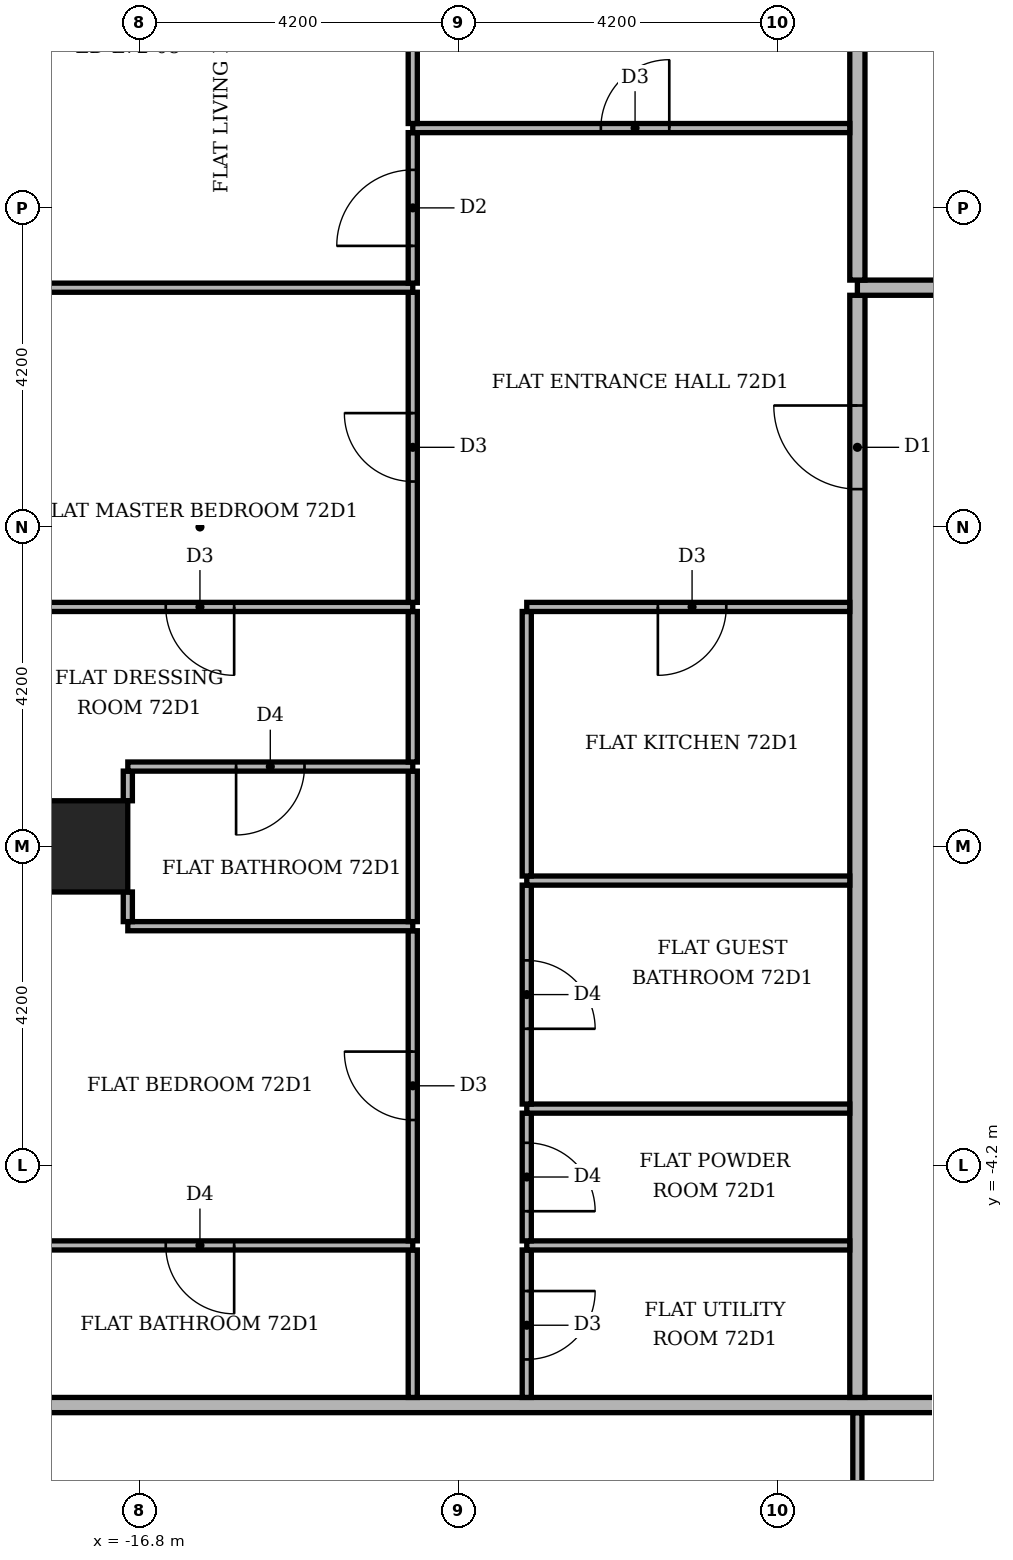
"""IFC4 building model, lengths in metres.
Left out: names, types, materials, properties, quantities, classifications, styles, units other than length and angle.
Written with IfcOpenShell. Run it as: python <this file> out.ifc"""

import sys

from ifc_helpers import new_model, si_unit, direction, frame, frame_2d, origin, origin_2d, place, context, subcontext, project, spatial, rectangle, extrude, element, fill, save


model = new_model("IFC4")
c1 = context("Model", 3, precision=1e-05, world=origin(), true_north=direction((0.0, 1.0)))
c2 = subcontext(c1, "Body", "Model", "MODEL_VIEW")
j1 = project(units=[si_unit("LENGTHUNIT", "METRE"), si_unit("PLANEANGLEUNIT", "RADIAN")], contexts=[c1])
p1 = place(None, origin())
s1 = spatial("IfcSite", under=j1, at=p1, CompositionType="ELEMENT")
p2 = place(p1, origin())
s2 = spatial("IfcBuilding", under=s1, at=p2, CompositionType="ELEMENT")
p3 = place(p2, frame((0.0, 0.0, 300.6)))
s3 = spatial("IfcBuildingStorey", under=s2, at=p3, CompositionType="ELEMENT", Elevation=300.6)
p4 = place(p3, frame((-17.55, 0.0, -0.35), z_axis=(0.0, 0.0, 1.0), x_axis=(1.0, 0.0, 0.0)))
e1 = element("IfcColumn", 1, at=p4, inside=s3, PredefinedType="COLUMN", context=c2, shape_type="SweptSolid", body=[
    extrude(rectangle(XDim=1.2, YDim=1.2, at=origin_2d()), origin(), (0.0, 0.0, 1.0), 4.25),
])
p5 = place(p3, frame((-7.35, -12.84, 0.0), z_axis=(0.0, 0.0, 1.0), x_axis=(0.0, 1.0, 0.0)))
e2 = element("IfcWall", 2, at=p5, inside=s3, PredefinedType="PARTITIONING", context=c2, shape_type="SweptSolid", body=[
    extrude(rectangle(XDim=5.39, YDim=0.12, at=frame_2d((2.695, 0.0))), origin(), (0.0, 0.0, 1.0), 3.55),
])
p6 = place(p5, frame((2.265, 0.0, 0.0)))
e3 = element("IfcOpeningElement", 3, at=p6, cuts=e2, PredefinedType="OPENING", context=c2, shape_type="SweptSolid", body=[
    extrude(rectangle(XDim=0.9, YDim=2.1, at=frame_2d((0.45, 1.05))), frame((0.0, 0.07, 0.0), z_axis=(0.0, -1.0, 0.0), x_axis=(1.0, 0.0, 0.0)), (0.0, 0.0, 1.0), 0.14),
])
p7 = place(p3, frame((-18.5, -7.35, 0.0), z_axis=(0.0, 0.0, 1.0), x_axis=(1.0, 0.0, 0.0)))
e4 = element("IfcWall", 4, at=p7, inside=s3, PredefinedType="PARTITIONING", context=c2, shape_type="SweptSolid", body=[
    extrude(rectangle(XDim=25.85, YDim=0.2, at=frame_2d((12.925, 0.0))), origin(), (0.0, 0.0, 1.0), 3.55),
])
p8 = place(p7, frame((13.75, 0.0, 0.0)))
e5 = element("IfcOpeningElement", 5, at=p8, cuts=e4, PredefinedType="OPENING", context=c2, shape_type="SweptSolid", body=[
    extrude(rectangle(XDim=1.1, YDim=2.4, at=frame_2d((0.55, 1.2))), frame((0.0, 0.11, 0.0), z_axis=(0.0, -1.0, 0.0), x_axis=(1.0, 0.0, 0.0)), (0.0, 0.0, 1.0), 0.22),
])
p9 = place(p3, frame((-13.2, -7.25, 0.0), z_axis=(0.0, 0.0, 1.0), x_axis=(0.0, 1.0, 0.0)))
e6 = element("IfcWall", 6, at=p9, inside=s3, PredefinedType="PARTITIONING", context=c2, shape_type="SweptSolid", body=[
    extrude(rectangle(XDim=1.94, YDim=0.12, at=frame_2d((0.97, 0.0))), origin(), (0.0, 0.0, 1.0), 3.55),
])
p10 = place(p3, frame((-11.7, -7.25, 0.0), z_axis=(0.0, 0.0, 1.0), x_axis=(0.0, 1.0, 0.0)))
e7 = element("IfcWall", 7, at=p10, inside=s3, PredefinedType="PARTITIONING", context=c2, shape_type="SweptSolid", body=[
    extrude(rectangle(XDim=1.94, YDim=0.12, at=frame_2d((0.97, 0.0))), origin(), (0.0, 0.0, 1.0), 3.55),
])
p11 = place(p10, frame((0.5, 0.0, 0.0)))
e8 = element("IfcOpeningElement", 8, at=p11, cuts=e7, PredefinedType="OPENING", context=c2, shape_type="SweptSolid", body=[
    extrude(rectangle(XDim=0.9, YDim=2.1, at=frame_2d((0.45, 1.05))), frame((0.0, 0.07, 0.0), z_axis=(0.0, -1.0, 0.0), x_axis=(1.0, 0.0, 0.0)), (0.0, 0.0, 1.0), 0.14),
])
p12 = place(p3, frame((-7.35, -7.25, 0.0), z_axis=(0.0, 0.0, 1.0), x_axis=(0.0, 1.0, 0.0)))
e9 = element("IfcWall", 9, at=p12, inside=s3, PredefinedType="PARTITIONING", context=c2, shape_type="SweptSolid", body=[
    extrude(rectangle(XDim=14.5, YDim=0.2, at=frame_2d((7.25, 0.0))), origin(), (0.0, 0.0, 1.0), 3.55),
])
p13 = place(p12, frame((11.95, 0.0, 0.0)))
e10 = element("IfcOpeningElement", 10, at=p13, cuts=e9, PredefinedType="OPENING", context=c2, shape_type="SweptSolid", body=[
    extrude(rectangle(XDim=1.1, YDim=2.4, at=frame_2d((0.55, 1.2))), frame((0.0, 0.11, 0.0), z_axis=(0.0, -1.0, 0.0), x_axis=(1.0, 0.0, 0.0)), (0.0, 0.0, 1.0), 0.22),
])
p14 = place(p3, frame((-18.5, -5.25, 0.0), z_axis=(0.0, 0.0, 1.0), x_axis=(1.0, 0.0, 0.0)))
e11 = element("IfcWall", 11, at=p14, inside=s3, PredefinedType="PARTITIONING", context=c2, shape_type="SweptSolid", body=[
    extrude(rectangle(XDim=5.3, YDim=0.12, at=frame_2d((2.65, 0.0))), origin(), (0.0, 0.0, 1.0), 3.55),
])
p15 = place(p14, frame((2.05, 0.0, 0.0)))
e12 = element("IfcOpeningElement", 12, at=p15, cuts=e11, PredefinedType="OPENING", context=c2, shape_type="SweptSolid", body=[
    extrude(rectangle(XDim=0.9, YDim=2.1, at=frame_2d((0.45, 1.05))), frame((0.0, 0.07, 0.0), z_axis=(0.0, -1.0, 0.0), x_axis=(1.0, 0.0, 0.0)), (0.0, 0.0, 1.0), 0.14),
])
p16 = place(p3, frame((-11.7, -5.25, 0.0), z_axis=(0.0, 0.0, 1.0), x_axis=(1.0, 0.0, 0.0)))
e13 = element("IfcWall", 13, at=p16, inside=s3, PredefinedType="PARTITIONING", context=c2, shape_type="SweptSolid", body=[
    extrude(rectangle(XDim=4.25, YDim=0.12, at=frame_2d((2.125, 0.0))), origin(), (0.0, 0.0, 1.0), 3.55),
])
p17 = place(p3, frame((-13.2, -5.19, 0.0), z_axis=(0.0, 0.0, 1.0), x_axis=(0.0, 1.0, 0.0)))
e14 = element("IfcWall", 14, at=p17, inside=s3, PredefinedType="PARTITIONING", context=c2, shape_type="SweptSolid", body=[
    extrude(rectangle(XDim=4.08, YDim=0.12, at=frame_2d((2.04, 0.0))), origin(), (0.0, 0.0, 1.0), 3.55),
])
p18 = place(p17, frame((1.59, 0.0, 0.0)))
e15 = element("IfcOpeningElement", 15, at=p18, cuts=e14, PredefinedType="OPENING", context=c2, shape_type="SweptSolid", body=[
    extrude(rectangle(XDim=0.9, YDim=2.1, at=frame_2d((0.45, 1.05))), frame((0.0, 0.07, 0.0), z_axis=(0.0, -1.0, 0.0), x_axis=(1.0, 0.0, 0.0)), (0.0, 0.0, 1.0), 0.14),
])
p19 = place(p3, frame((-11.7, -5.19, 0.0), z_axis=(0.0, 0.0, 1.0), x_axis=(0.0, 1.0, 0.0)))
e16 = element("IfcWall", 16, at=p19, inside=s3, PredefinedType="PARTITIONING", context=c2, shape_type="SweptSolid", body=[
    extrude(rectangle(XDim=1.68, YDim=0.12, at=frame_2d((0.84, 0.0))), origin(), (0.0, 0.0, 1.0), 3.55),
])
p20 = place(p19, frame((0.39, 0.0, 0.0)))
e17 = element("IfcOpeningElement", 17, at=p20, cuts=e16, PredefinedType="OPENING", context=c2, shape_type="SweptSolid", body=[
    extrude(rectangle(XDim=0.9, YDim=2.1, at=frame_2d((0.45, 1.05))), frame((0.0, 0.07, 0.0), z_axis=(0.0, -1.0, 0.0), x_axis=(1.0, 0.0, 0.0)), (0.0, 0.0, 1.0), 0.14),
])
p21 = place(p3, frame((-11.7, -3.45, 0.0), z_axis=(0.0, 0.0, 1.0), x_axis=(1.0, 0.0, 0.0)))
e18 = element("IfcWall", 18, at=p21, inside=s3, PredefinedType="PARTITIONING", context=c2, shape_type="SweptSolid", body=[
    extrude(rectangle(XDim=4.25, YDim=0.12, at=frame_2d((2.125, 0.0))), origin(), (0.0, 0.0, 1.0), 3.55),
])
p22 = place(p3, frame((-11.7, -3.39, 0.0), z_axis=(0.0, 0.0, 1.0), x_axis=(0.0, 1.0, 0.0)))
e19 = element("IfcWall", 19, at=p22, inside=s3, PredefinedType="PARTITIONING", context=c2, shape_type="SweptSolid", body=[
    extrude(rectangle(XDim=2.88, YDim=0.12, at=frame_2d((1.44, 0.0))), origin(), (0.0, 0.0, 1.0), 3.55),
])
p23 = place(p22, frame((0.99, 0.0, 0.0)))
e20 = element("IfcOpeningElement", 20, at=p23, cuts=e19, PredefinedType="OPENING", context=c2, shape_type="SweptSolid", body=[
    extrude(rectangle(XDim=0.9, YDim=2.1, at=frame_2d((0.45, 1.05))), frame((0.0, 0.07, 0.0), z_axis=(0.0, -1.0, 0.0), x_axis=(1.0, 0.0, 0.0)), (0.0, 0.0, 1.0), 0.14),
])
p24 = place(p3, frame((-16.949, -1.05, 0.0), z_axis=(0.0, 0.0, 1.0), x_axis=(1.0, 0.0, 0.0)))
e21 = element("IfcWall", 21, at=p24, inside=s3, PredefinedType="PARTITIONING", context=c2, shape_type="SweptSolid", body=[
    extrude(rectangle(XDim=3.749, YDim=0.12, at=frame_2d((1.875, 0.0))), origin(), (0.0, 0.0, 1.0), 3.55),
])
p25 = place(p3, frame((-16.949, -0.99, 0.0), z_axis=(0.0, 0.0, 1.0), x_axis=(0.0, 1.0, 0.0)))
e22 = element("IfcWall", 22, at=p25, inside=s3, PredefinedType="PARTITIONING", context=c2, shape_type="SweptSolid", body=[
    extrude(rectangle(XDim=0.39, YDim=0.12, at=frame_2d((0.195, 0.0))), origin(), (0.0, 0.0, 1.0), 3.55),
])
p26 = place(p3, frame((-13.2, -0.99, 0.0), z_axis=(0.0, 0.0, 1.0), x_axis=(0.0, 1.0, 0.0)))
e23 = element("IfcWall", 23, at=p26, inside=s3, PredefinedType="PARTITIONING", context=c2, shape_type="SweptSolid", body=[
    extrude(rectangle(XDim=1.98, YDim=0.12, at=frame_2d((0.99, 0.0))), origin(), (0.0, 0.0, 1.0), 3.55),
])
p27 = place(p3, frame((-11.7, -0.45, 0.0), z_axis=(0.0, 0.0, 1.0), x_axis=(1.0, 0.0, 0.0)))
e24 = element("IfcWall", 24, at=p27, inside=s3, PredefinedType="PARTITIONING", context=c2, shape_type="SweptSolid", body=[
    extrude(rectangle(XDim=4.25, YDim=0.12, at=frame_2d((2.125, 0.0))), origin(), (0.0, 0.0, 1.0), 3.55),
])
p28 = place(p3, frame((-11.7, -0.39, 0.0), z_axis=(0.0, 0.0, 1.0), x_axis=(0.0, 1.0, 0.0)))
e25 = element("IfcWall", 25, at=p28, inside=s3, PredefinedType="PARTITIONING", context=c2, shape_type="SweptSolid", body=[
    extrude(rectangle(XDim=3.48, YDim=0.12, at=frame_2d((1.74, 0.0))), origin(), (0.0, 0.0, 1.0), 3.55),
])
p29 = place(p3, frame((-16.949, 0.6, 0.0), z_axis=(0.0, 0.0, 1.0), x_axis=(0.0, 1.0, 0.0)))
e26 = element("IfcWall", 26, at=p29, inside=s3, PredefinedType="PARTITIONING", context=c2, shape_type="SweptSolid", body=[
    extrude(rectangle(XDim=0.39, YDim=0.12, at=frame_2d((0.195, 0.0))), origin(), (0.0, 0.0, 1.0), 3.55),
])
p30 = place(p3, frame((-16.949, 1.05, 0.0), z_axis=(0.0, 0.0, 1.0), x_axis=(1.0, 0.0, 0.0)))
e27 = element("IfcWall", 27, at=p30, inside=s3, PredefinedType="PARTITIONING", context=c2, shape_type="SweptSolid", body=[
    extrude(rectangle(XDim=3.749, YDim=0.12, at=frame_2d((1.875, 0.0))), origin(), (0.0, 0.0, 1.0), 3.55),
])
p31 = place(p30, frame((1.425, 0.0, 0.0)))
e28 = element("IfcOpeningElement", 28, at=p31, cuts=e27, PredefinedType="OPENING", context=c2, shape_type="SweptSolid", body=[
    extrude(rectangle(XDim=0.9, YDim=2.1, at=frame_2d((0.45, 1.05))), frame((0.0, 0.07, 0.0), z_axis=(0.0, -1.0, 0.0), x_axis=(1.0, 0.0, 0.0)), (0.0, 0.0, 1.0), 0.14),
])
p32 = place(p3, frame((-13.2, 1.11, 0.0), z_axis=(0.0, 0.0, 1.0), x_axis=(0.0, 1.0, 0.0)))
e29 = element("IfcWall", 29, at=p32, inside=s3, PredefinedType="PARTITIONING", context=c2, shape_type="SweptSolid", body=[
    extrude(rectangle(XDim=1.98, YDim=0.12, at=frame_2d((0.99, 0.0))), origin(), (0.0, 0.0, 1.0), 3.55),
])
p33 = place(p3, frame((-18.5, 3.15, 0.0), z_axis=(0.0, 0.0, 1.0), x_axis=(1.0, 0.0, 0.0)))
e30 = element("IfcWall", 30, at=p33, inside=s3, PredefinedType="PARTITIONING", context=c2, shape_type="SweptSolid", body=[
    extrude(rectangle(XDim=5.3, YDim=0.12, at=frame_2d((2.65, 0.0))), origin(), (0.0, 0.0, 1.0), 3.55),
])
p34 = place(p33, frame((2.05, 0.0, 0.0)))
e31 = element("IfcOpeningElement", 31, at=p34, cuts=e30, PredefinedType="OPENING", context=c2, shape_type="SweptSolid", body=[
    extrude(rectangle(XDim=0.9, YDim=2.1, at=frame_2d((0.45, 1.05))), frame((0.0, 0.07, 0.0), z_axis=(0.0, -1.0, 0.0), x_axis=(1.0, 0.0, 0.0)), (0.0, 0.0, 1.0), 0.14),
])
p35 = place(p3, frame((-11.7, 3.15, 0.0), z_axis=(0.0, 0.0, 1.0), x_axis=(1.0, 0.0, 0.0)))
e32 = element("IfcWall", 32, at=p35, inside=s3, PredefinedType="PARTITIONING", context=c2, shape_type="SweptSolid", body=[
    extrude(rectangle(XDim=4.25, YDim=0.12, at=frame_2d((2.125, 0.0))), origin(), (0.0, 0.0, 1.0), 3.55),
])
p36 = place(p35, frame((1.725, 0.0, 0.0)))
e33 = element("IfcOpeningElement", 33, at=p36, cuts=e32, PredefinedType="OPENING", context=c2, shape_type="SweptSolid", body=[
    extrude(rectangle(XDim=0.9, YDim=2.1, at=frame_2d((0.45, 1.05))), frame((0.0, 0.07, 0.0), z_axis=(0.0, -1.0, 0.0), x_axis=(1.0, 0.0, 0.0)), (0.0, 0.0, 1.0), 0.14),
])
p37 = place(p3, frame((-13.2, 3.21, 0.0), z_axis=(0.0, 0.0, 1.0), x_axis=(0.0, 1.0, 0.0)))
e34 = element("IfcWall", 34, at=p37, inside=s3, PredefinedType="PARTITIONING", context=c2, shape_type="SweptSolid", body=[
    extrude(rectangle(XDim=4.08, YDim=0.12, at=frame_2d((2.04, 0.0))), origin(), (0.0, 0.0, 1.0), 3.55),
])
p38 = place(p37, frame((1.59, 0.0, 0.0)))
e35 = element("IfcOpeningElement", 35, at=p38, cuts=e34, PredefinedType="OPENING", context=c2, shape_type="SweptSolid", body=[
    extrude(rectangle(XDim=0.9, YDim=2.1, at=frame_2d((0.45, 1.05))), frame((0.0, 0.07, 0.0), z_axis=(0.0, -1.0, 0.0), x_axis=(1.0, 0.0, 0.0)), (0.0, 0.0, 1.0), 0.14),
])
p39 = place(p3, frame((-18.5, 7.35, 0.0), z_axis=(0.0, 0.0, 1.0), x_axis=(1.0, 0.0, 0.0)))
e36 = element("IfcWall", 36, at=p39, inside=s3, PredefinedType="PARTITIONING", context=c2, shape_type="SweptSolid", body=[
    extrude(rectangle(XDim=5.3, YDim=0.12, at=frame_2d((2.65, 0.0))), origin(), (0.0, 0.0, 1.0), 3.55),
])
p40 = place(p3, frame((-7.35, 7.35, 0.0), z_axis=(0.0, 0.0, 1.0), x_axis=(1.0, 0.0, 0.0)))
e37 = element("IfcWall", 37, at=p40, inside=s3, PredefinedType="PARTITIONING", context=c2, shape_type="SweptSolid", body=[
    extrude(rectangle(XDim=1.85, YDim=0.2, at=frame_2d((0.925, 0.0))), origin(), (0.0, 0.0, 1.0), 3.55),
])
p41 = place(p3, frame((-13.2, 7.41, 0.0), z_axis=(0.0, 0.0, 1.0), x_axis=(0.0, 1.0, 0.0)))
e38 = element("IfcWall", 38, at=p41, inside=s3, PredefinedType="PARTITIONING", context=c2, shape_type="SweptSolid", body=[
    extrude(rectangle(XDim=1.98, YDim=0.12, at=frame_2d((0.99, 0.0))), origin(), (0.0, 0.0, 1.0), 3.55),
])
p42 = place(p41, frame((0.49, 0.0, 0.0)))
e39 = element("IfcOpeningElement", 39, at=p42, cuts=e38, PredefinedType="OPENING", context=c2, shape_type="SweptSolid", body=[
    extrude(rectangle(XDim=1.0, YDim=2.1, at=frame_2d((0.5, 1.05))), frame((0.0, 0.07, 0.0), z_axis=(0.0, -1.0, 0.0), x_axis=(1.0, 0.0, 0.0)), (0.0, 0.0, 1.0), 0.14),
])
p43 = place(p3, frame((-7.35, 7.45, 0.0), z_axis=(0.0, 0.0, 1.0), x_axis=(0.0, 1.0, 0.0)))
e40 = element("IfcWall", 40, at=p43, inside=s3, PredefinedType="PARTITIONING", context=c2, shape_type="SweptSolid", body=[
    extrude(rectangle(XDim=11.05, YDim=0.2, at=frame_2d((5.525, 0.0))), origin(), (0.0, 0.0, 1.0), 3.55),
])
p44 = place(p3, frame((-13.2, 9.45, 0.0), z_axis=(0.0, 0.0, 1.0), x_axis=(1.0, 0.0, 0.0)))
e41 = element("IfcWall", 41, at=p44, inside=s3, PredefinedType="PARTITIONING", context=c2, shape_type="SweptSolid", body=[
    extrude(rectangle(XDim=5.75, YDim=0.12, at=frame_2d((2.875, 0.0))), origin(), (0.0, 0.0, 1.0), 3.55),
])
p45 = place(p44, frame((2.475, 0.0, 0.0)))
e42 = element("IfcOpeningElement", 42, at=p45, cuts=e41, PredefinedType="OPENING", context=c2, shape_type="SweptSolid", body=[
    extrude(rectangle(XDim=0.9, YDim=2.1, at=frame_2d((0.45, 1.05))), frame((0.0, 0.07, 0.0), z_axis=(0.0, -1.0, 0.0), x_axis=(1.0, 0.0, 0.0)), (0.0, 0.0, 1.0), 0.14),
])
p46 = place(p3, frame((-13.2, 9.51, 0.0), z_axis=(0.0, 0.0, 1.0), x_axis=(0.0, 1.0, 0.0)))
e43 = element("IfcWall", 43, at=p46, inside=s3, PredefinedType="PARTITIONING", context=c2, shape_type="SweptSolid", body=[
    extrude(rectangle(XDim=2.59, YDim=0.12, at=frame_2d((1.295, 0.0))), origin(), (0.0, 0.0, 1.0), 3.55),
])
p47 = place(p13, origin())
e44 = element("IfcDoor", 44, at=p47, inside=s3, OperationType="SINGLE_SWING_RIGHT", PredefinedType="DOOR", context=c2, shape_type="SweptSolid", body=[
    extrude(rectangle(XDim=1.1, YDim=2.4, at=frame_2d((0.55, 1.2))), frame((0.0, 0.025, 0.0), z_axis=(0.0, -1.0, 0.0), x_axis=(1.0, 0.0, 0.0)), (0.0, 0.0, 1.0), 0.05),
])
fill(e10, e44)
p48 = place(p45, origin())
e45 = element("IfcDoor", 45, at=p48, inside=s3, OperationType="SINGLE_SWING_RIGHT", PredefinedType="DOOR", context=c2, shape_type="SweptSolid", body=[
    extrude(rectangle(XDim=0.9, YDim=2.1, at=frame_2d((0.45, 1.05))), frame((0.0, 0.025, 0.0), z_axis=(0.0, -1.0, 0.0), x_axis=(1.0, 0.0, 0.0)), (0.0, 0.0, 1.0), 0.05),
])
fill(e42, e45)
p49 = place(p36, frame((0.9, 0.0, 0.0), z_axis=(0.0, 0.0, 1.0), x_axis=(-1.0, 0.0, 0.0)))
e46 = element("IfcDoor", 46, at=p49, inside=s3, OperationType="SINGLE_SWING_LEFT", PredefinedType="DOOR", context=c2, shape_type="SweptSolid", body=[
    extrude(rectangle(XDim=0.9, YDim=2.1, at=frame_2d((0.45, 1.05))), frame((0.0, 0.025, 0.0), z_axis=(0.0, -1.0, 0.0), x_axis=(1.0, 0.0, 0.0)), (0.0, 0.0, 1.0), 0.05),
])
fill(e33, e46)
p50 = place(p23, frame((0.9, 0.0, 0.0), z_axis=(0.0, 0.0, 1.0), x_axis=(-1.0, 0.0, 0.0)))
e47 = element("IfcDoor", 47, at=p50, inside=s3, OperationType="SINGLE_SWING_LEFT", PredefinedType="DOOR", context=c2, shape_type="SweptSolid", body=[
    extrude(rectangle(XDim=0.9, YDim=2.1, at=frame_2d((0.45, 1.05))), frame((0.0, 0.025, 0.0), z_axis=(0.0, -1.0, 0.0), x_axis=(1.0, 0.0, 0.0)), (0.0, 0.0, 1.0), 0.05),
])
fill(e20, e47)
p51 = place(p20, frame((0.9, 0.0, 0.0), z_axis=(0.0, 0.0, 1.0), x_axis=(-1.0, 0.0, 0.0)))
e48 = element("IfcDoor", 48, at=p51, inside=s3, OperationType="SINGLE_SWING_LEFT", PredefinedType="DOOR", context=c2, shape_type="SweptSolid", body=[
    extrude(rectangle(XDim=0.9, YDim=2.1, at=frame_2d((0.45, 1.05))), frame((0.0, 0.025, 0.0), z_axis=(0.0, -1.0, 0.0), x_axis=(1.0, 0.0, 0.0)), (0.0, 0.0, 1.0), 0.05),
])
fill(e17, e48)
p52 = place(p11, frame((0.9, 0.0, 0.0), z_axis=(0.0, 0.0, 1.0), x_axis=(-1.0, 0.0, 0.0)))
e49 = element("IfcDoor", 49, at=p52, inside=s3, OperationType="SINGLE_SWING_RIGHT", PredefinedType="DOOR", context=c2, shape_type="SweptSolid", body=[
    extrude(rectangle(XDim=0.9, YDim=2.1, at=frame_2d((0.45, 1.05))), frame((0.0, 0.025, 0.0), z_axis=(0.0, -1.0, 0.0), x_axis=(1.0, 0.0, 0.0)), (0.0, 0.0, 1.0), 0.05),
])
fill(e8, e49)
p53 = place(p42, origin())
e50 = element("IfcDoor", 50, at=p53, inside=s3, OperationType="SINGLE_SWING_LEFT", PredefinedType="DOOR", context=c2, shape_type="SweptSolid", body=[
    extrude(rectangle(XDim=1.0, YDim=2.1, at=frame_2d((0.5, 1.05))), frame((0.0, 0.025, 0.0), z_axis=(0.0, -1.0, 0.0), x_axis=(1.0, 0.0, 0.0)), (0.0, 0.0, 1.0), 0.05),
])
fill(e39, e50)
p54 = place(p38, origin())
e51 = element("IfcDoor", 51, at=p54, inside=s3, OperationType="SINGLE_SWING_RIGHT", PredefinedType="DOOR", context=c2, shape_type="SweptSolid", body=[
    extrude(rectangle(XDim=0.9, YDim=2.1, at=frame_2d((0.45, 1.05))), frame((0.0, 0.025, 0.0), z_axis=(0.0, -1.0, 0.0), x_axis=(1.0, 0.0, 0.0)), (0.0, 0.0, 1.0), 0.05),
])
fill(e35, e51)
p55 = place(p34, frame((0.9, 0.0, 0.0), z_axis=(0.0, 0.0, 1.0), x_axis=(-1.0, 0.0, 0.0)))
e52 = element("IfcDoor", 52, at=p55, inside=s3, OperationType="SINGLE_SWING_RIGHT", PredefinedType="DOOR", context=c2, shape_type="SweptSolid", body=[
    extrude(rectangle(XDim=0.9, YDim=2.1, at=frame_2d((0.45, 1.05))), frame((0.0, 0.025, 0.0), z_axis=(0.0, -1.0, 0.0), x_axis=(1.0, 0.0, 0.0)), (0.0, 0.0, 1.0), 0.05),
])
fill(e31, e52)
p56 = place(p31, frame((0.9, 0.0, 0.0), z_axis=(0.0, 0.0, 1.0), x_axis=(-1.0, 0.0, 0.0)))
e53 = element("IfcDoor", 53, at=p56, inside=s3, OperationType="SINGLE_SWING_LEFT", PredefinedType="DOOR", context=c2, shape_type="SweptSolid", body=[
    extrude(rectangle(XDim=0.9, YDim=2.1, at=frame_2d((0.45, 1.05))), frame((0.0, 0.025, 0.0), z_axis=(0.0, -1.0, 0.0), x_axis=(1.0, 0.0, 0.0)), (0.0, 0.0, 1.0), 0.05),
])
fill(e28, e53)
p57 = place(p18, origin())
e54 = element("IfcDoor", 54, at=p57, inside=s3, OperationType="SINGLE_SWING_RIGHT", PredefinedType="DOOR", context=c2, shape_type="SweptSolid", body=[
    extrude(rectangle(XDim=0.9, YDim=2.1, at=frame_2d((0.45, 1.05))), frame((0.0, 0.025, 0.0), z_axis=(0.0, -1.0, 0.0), x_axis=(1.0, 0.0, 0.0)), (0.0, 0.0, 1.0), 0.05),
])
fill(e15, e54)
p58 = place(p15, frame((0.9, 0.0, 0.0), z_axis=(0.0, 0.0, 1.0), x_axis=(-1.0, 0.0, 0.0)))
e55 = element("IfcDoor", 55, at=p58, inside=s3, OperationType="SINGLE_SWING_RIGHT", PredefinedType="DOOR", context=c2, shape_type="SweptSolid", body=[
    extrude(rectangle(XDim=0.9, YDim=2.1, at=frame_2d((0.45, 1.05))), frame((0.0, 0.025, 0.0), z_axis=(0.0, -1.0, 0.0), x_axis=(1.0, 0.0, 0.0)), (0.0, 0.0, 1.0), 0.05),
])
fill(e12, e55)
save(model, sys.argv[1])
